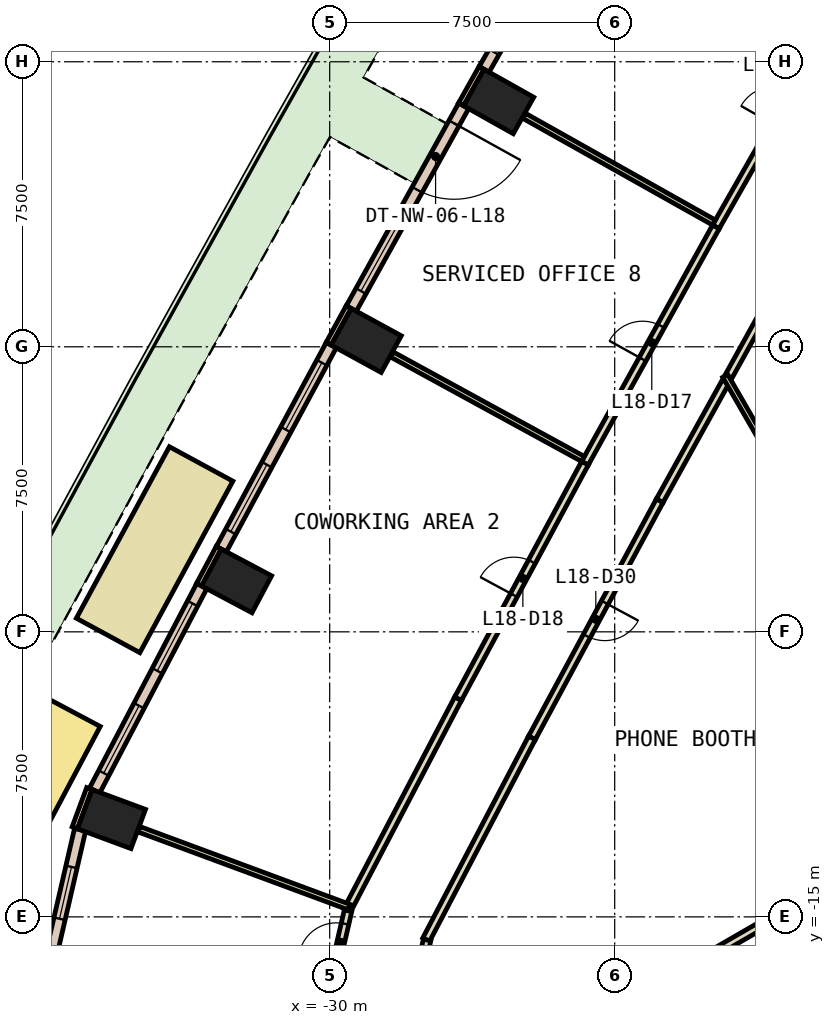
"""IFC4 building model, lengths in metres.
Left out: names, types, materials, properties, quantities, classifications, styles, units other than length and angle.
Written with IfcOpenShell. Run it as: python <this file> out.ifc"""

import sys

from ifc_helpers import new_model, si_unit, direction, frame, frame_2d, origin, origin_2d, place, context, subcontext, project, spatial, rectangle, extrude, element, fill, save


model = new_model("IFC4")
c1 = context("Model", 3, precision=1e-05, world=origin(), true_north=direction((0.0, 1.0)))
c2 = subcontext(c1, "Body", "Model", "MODEL_VIEW")
j1 = project(units=[si_unit("LENGTHUNIT", "METRE"), si_unit("PLANEANGLEUNIT", "RADIAN")], contexts=[c1])
p1 = place(None, origin())
s1 = spatial("IfcSite", under=j1, at=p1, CompositionType="ELEMENT")
p2 = place(p1, origin())
s2 = spatial("IfcBuilding", under=s1, at=p2, CompositionType="ELEMENT")
p3 = place(p2, frame((0.0, 0.0, 86.6)))
s3 = spatial("IfcBuildingStorey", under=s2, at=p3, CompositionType="ELEMENT", Elevation=86.6)
for number, where, z_axis, x_axis in (
    (1, (-25.554, 6.454, 0.0), (0.0, 0.0, 1.0), (0.49, 0.872, 0.0)),
    (2, (-29.039, 0.167, 0.0), (0.0, 0.0, 1.0), (0.48, 0.877, 0.0)),
    (3, (-32.449, -6.16, 0.0), (0.0, 0.0, 1.0), (0.469, 0.883, 0.0)),
    (4, (-35.741, -12.427, 0.0), (0.0, 0.0, 1.0), (0.347, 0.938, 0.0)),
):
    element("IfcColumn", number, at=place(p3, frame(where, z_axis=z_axis, x_axis=x_axis)), inside=s3, PredefinedType="COLUMN", context=c2, shape_type="SweptSolid", body=[
        extrude(rectangle(XDim=1.1, YDim=1.5, at=origin_2d()), origin(), (0.0, 0.0, 1.0), 3.8),
    ])
p4 = place(p3, frame((-26.004, 7.338, 0.0), z_axis=(0.0, 0.0, 1.0), x_axis=(-0.490008344094, -0.871717742574, 0.0)))
e5 = element("IfcWall", 5, at=p4, inside=s3, PredefinedType="STANDARD", context=c2, shape_type="SweptSolid", body=[
    extrude(rectangle(XDim=1.1, YDim=0.15, at=frame_2d((0.55, 0.0))), origin(), (0.0, 0.0, 1.0), 3.8),
])
p5 = place(p3, frame((-29.499, 1.046, 0.0), z_axis=(0.0, 0.0, 1.0), x_axis=(-0.479737645119, -0.877411985247, 0.0)))
e6 = element("IfcWall", 6, at=p5, inside=s3, PredefinedType="STANDARD", context=c2, shape_type="SweptSolid", body=[
    extrude(rectangle(XDim=1.101, YDim=0.15, at=frame_2d((0.55, 0.0))), origin(), (0.0, 0.0, 1.0), 3.8),
])
p6 = place(p3, frame((-32.92, -5.288, 0.0), z_axis=(0.0, 0.0, 1.0), x_axis=(-0.469366248657, -0.883003581319, 0.0)))
e7 = element("IfcWall", 7, at=p6, inside=s3, PredefinedType="STANDARD", context=c2, shape_type="SweptSolid", body=[
    extrude(rectangle(XDim=1.1, YDim=0.15, at=frame_2d((0.55, 0.0))), origin(), (0.0, 0.0, 1.0), 3.8),
])
p7 = place(p3, frame((-36.324, -11.624, 0.0), z_axis=(0.0, 0.0, 1.0), x_axis=(-0.347205967468, -0.937788897436, 0.0)))
e8 = element("IfcWall", 8, at=p7, inside=s3, PredefinedType="STANDARD", context=c2, shape_type="SweptSolid", body=[
    extrude(rectangle(XDim=1.1, YDim=0.15, at=frame_2d((0.55, 0.0))), origin(), (0.0, 0.0, 1.0), 3.8),
])
p8 = place(p3, frame((-22.918, 12.598, 0.0), z_axis=(0.0, 0.0, 1.0), x_axis=(-0.49492259535, -0.868937065967, 0.0)))
e9 = element("IfcWall", 9, at=p8, inside=s3, PredefinedType="STANDARD", context=c2, shape_type="SweptSolid", body=[
    extrude(rectangle(XDim=6.098, YDim=0.3, at=frame_2d((3.049, 0.0))), origin(), (0.0, 0.0, 1.0), 3.8),
])
p9 = place(p8, frame((0.525, 0.0, 0.9)))
e10 = element("IfcOpeningElement", 10, at=p9, cuts=e9, PredefinedType="OPENING", context=c2, shape_type="SweptSolid", body=[
    extrude(rectangle(XDim=2.0, YDim=2.6, at=frame_2d((1.0, 1.3))), frame((0.0, 0.16, 0.0), z_axis=(0.0, -1.0, 0.0), x_axis=(1.0, 0.0, 0.0)), (0.0, 0.0, 1.0), 0.32),
])
p10 = place(p8, frame((3.574, 0.0, 0.9)))
e11 = element("IfcOpeningElement", 11, at=p10, cuts=e9, PredefinedType="OPENING", context=c2, shape_type="SweptSolid", body=[
    extrude(rectangle(XDim=2.0, YDim=2.6, at=frame_2d((1.0, 1.3))), frame((0.0, 0.16, 0.0), z_axis=(0.0, -1.0, 0.0), x_axis=(1.0, 0.0, 0.0)), (0.0, 0.0, 1.0), 0.32),
])
p11 = place(p3, frame((-26.474, 6.341, 0.0), z_axis=(0.0, 0.0, 1.0), x_axis=(-0.484823579315, -0.874611969356, 0.0)))
e12 = element("IfcWall", 12, at=p11, inside=s3, PredefinedType="STANDARD", context=c2, shape_type="SweptSolid", body=[
    extrude(rectangle(XDim=6.099, YDim=0.3, at=frame_2d((3.049, 0.0))), origin(), (0.0, 0.0, 1.0), 3.8),
])
p12 = place(p11, frame((0.525, 0.0, 0.0)))
e13 = element("IfcOpeningElement", 13, at=p12, cuts=e12, PredefinedType="OPENING", context=c2, shape_type="SweptSolid", body=[
    extrude(rectangle(XDim=2.0, YDim=2.4, at=frame_2d((1.0, 1.2))), frame((0.0, 0.16, 0.0), z_axis=(0.0, -1.0, 0.0), x_axis=(1.0, 0.0, 0.0)), (0.0, 0.0, 1.0), 0.32),
])
p13 = place(p11, frame((3.574, 0.0, 0.9)))
e14 = element("IfcOpeningElement", 14, at=p13, cuts=e12, PredefinedType="OPENING", context=c2, shape_type="SweptSolid", body=[
    extrude(rectangle(XDim=2.0, YDim=2.6, at=frame_2d((1.0, 1.3))), frame((0.0, 0.16, 0.0), z_axis=(0.0, -1.0, 0.0), x_axis=(1.0, 0.0, 0.0)), (0.0, 0.0, 1.0), 0.32),
])
p14 = place(p3, frame((-29.958, 0.044, 0.0), z_axis=(0.0, 0.0, 1.0), x_axis=(-0.474369552216, -0.880325807829, 0.0)))
e15 = element("IfcWall", 15, at=p14, inside=s3, PredefinedType="STANDARD", context=c2, shape_type="SweptSolid", body=[
    extrude(rectangle(XDim=6.099, YDim=0.3, at=frame_2d((3.049, 0.0))), origin(), (0.0, 0.0, 1.0), 3.8),
])
p15 = place(p14, frame((0.525, 0.0, 0.9)))
e16 = element("IfcOpeningElement", 16, at=p15, cuts=e15, PredefinedType="OPENING", context=c2, shape_type="SweptSolid", body=[
    extrude(rectangle(XDim=2.0, YDim=2.6, at=frame_2d((1.0, 1.3))), frame((0.0, 0.16, 0.0), z_axis=(0.0, -1.0, 0.0), x_axis=(1.0, 0.0, 0.0)), (0.0, 0.0, 1.0), 0.32),
])
p16 = place(p14, frame((3.574, 0.0, 0.9)))
e17 = element("IfcOpeningElement", 17, at=p16, cuts=e15, PredefinedType="OPENING", context=c2, shape_type="SweptSolid", body=[
    extrude(rectangle(XDim=2.0, YDim=2.6, at=frame_2d((1.0, 1.3))), frame((0.0, 0.16, 0.0), z_axis=(0.0, -1.0, 0.0), x_axis=(1.0, 0.0, 0.0)), (0.0, 0.0, 1.0), 0.32),
])
p17 = place(p3, frame((-33.366, -6.295, 0.0), z_axis=(0.0, 0.0, 1.0), x_axis=(-0.464187178015, -0.885737130173, 0.0)))
e18 = element("IfcWall", 18, at=p17, inside=s3, PredefinedType="STANDARD", context=c2, shape_type="SweptSolid", body=[
    extrude(rectangle(XDim=6.075, YDim=0.3, at=frame_2d((3.038, 0.0))), origin(), (0.0, 0.0, 1.0), 3.8),
])
p18 = place(p17, frame((0.519, 0.0, 0.9)))
e19 = element("IfcOpeningElement", 19, at=p18, cuts=e18, PredefinedType="OPENING", context=c2, shape_type="SweptSolid", body=[
    extrude(rectangle(XDim=2.0, YDim=2.6, at=frame_2d((1.0, 1.3))), frame((0.0, 0.16, 0.0), z_axis=(0.0, -1.0, 0.0), x_axis=(1.0, 0.0, 0.0)), (0.0, 0.0, 1.0), 0.32),
])
p19 = place(p17, frame((3.556, 0.0, 0.9)))
e20 = element("IfcOpeningElement", 20, at=p19, cuts=e18, PredefinedType="OPENING", context=c2, shape_type="SweptSolid", body=[
    extrude(rectangle(XDim=2.0, YDim=2.6, at=frame_2d((1.0, 1.3))), frame((0.0, 0.16, 0.0), z_axis=(0.0, -1.0, 0.0), x_axis=(1.0, 0.0, 0.0)), (0.0, 0.0, 1.0), 0.32),
])
p20 = place(p3, frame((-36.568, -12.706, 0.0), z_axis=(0.0, 0.0, 1.0), x_axis=(-0.224859506699, -0.974391195695, 0.0)))
e21 = element("IfcWall", 21, at=p20, inside=s3, PredefinedType="STANDARD", context=c2, shape_type="SweptSolid", body=[
    extrude(rectangle(XDim=3.41, YDim=0.3, at=frame_2d((1.705, 0.0))), origin(), (0.0, 0.0, 1.0), 3.8),
])
p21 = place(p20, frame((1.005, 0.0, 0.9)))
e22 = element("IfcOpeningElement", 22, at=p21, cuts=e21, PredefinedType="OPENING", context=c2, shape_type="SweptSolid", body=[
    extrude(rectangle(XDim=1.4, YDim=2.6, at=frame_2d((0.7, 1.3))), frame((0.0, 0.16, 0.0), z_axis=(0.0, -1.0, 0.0), x_axis=(1.0, 0.0, 0.0)), (0.0, 0.0, 1.0), 0.32),
])
p22 = place(p3, frame((-33.383, -3.082, 0.0), z_axis=(0.0, 0.0, 1.0), x_axis=(-0.476808502213, -0.879007196909, 0.0)))
e23 = element("IfcWall", 23, at=p22, inside=s3, PredefinedType="STANDARD", context=c2, shape_type="SweptSolid", body=[
    extrude(rectangle(XDim=5.134, YDim=1.9, at=frame_2d((2.567, 0.0))), origin(), (0.0, 0.0, 1.0), 0.8),
])
p23 = place(p3, frame((-36.877, -9.544, 0.0), z_axis=(0.0, 0.0, 1.0), x_axis=(-0.468973311577, -0.883212337453, 0.0)))
e24 = element("IfcWall", 24, at=p23, inside=s3, PredefinedType="STANDARD", context=c2, shape_type="SweptSolid", body=[
    extrude(rectangle(XDim=5.299, YDim=1.9, at=frame_2d((2.649, 0.0))), origin(), (0.0, 0.0, 1.0), 0.8),
])
p24 = place(p3, frame((-17.883, 2.143, 0.0), z_axis=(0.0, 0.0, 1.0), x_axis=(-0.484695523805, -0.874682942101, 0.0)))
e25 = element("IfcWall", 25, at=p24, inside=s3, PredefinedType="PARTITIONING", context=c2, shape_type="SweptSolid", body=[
    extrude(rectangle(XDim=3.349, YDim=0.2, at=frame_2d((1.674, 0.0))), origin(), (0.0, 0.0, 1.0), 3.8),
])
p25 = place(p3, frame((-19.579, -0.917, 0.0), z_axis=(0.0, 0.0, 1.0), x_axis=(-0.484700239797, -0.874680328772, 0.0)))
e26 = element("IfcWall", 26, at=p25, inside=s3, PredefinedType="PARTITIONING", context=c2, shape_type="SweptSolid", body=[
    extrude(rectangle(XDim=3.585, YDim=0.2, at=frame_2d((1.792, 0.0))), origin(), (0.0, 0.0, 1.0), 3.8),
])
p26 = place(p3, frame((-21.317, -4.053, 0.0), z_axis=(0.0, 0.0, 1.0), x_axis=(-0.474391588657, -0.880313932987, 0.0)))
e27 = element("IfcWall", 27, at=p26, inside=s3, PredefinedType="PARTITIONING", context=c2, shape_type="SweptSolid", body=[
    extrude(rectangle(XDim=7.085, YDim=0.2, at=frame_2d((3.542, 0.0))), origin(), (0.0, 0.0, 1.0), 3.8),
])
p27 = place(p26, frame((3.042, 0.0, 0.0)))
e28 = element("IfcOpeningElement", 28, at=p27, cuts=e27, PredefinedType="OPENING", context=c2, shape_type="SweptSolid", body=[
    extrude(rectangle(XDim=1.0, YDim=2.1, at=frame_2d((0.5, 1.05))), frame((0.0, 0.11, 0.0), z_axis=(0.0, -1.0, 0.0), x_axis=(1.0, 0.0, 0.0)), (0.0, 0.0, 1.0), 0.22),
])
p28 = place(p3, frame((-24.678, -10.29, 0.0), z_axis=(0.0, 0.0, 1.0), x_axis=(-0.464203280494, -0.885728691179, 0.0)))
e29 = element("IfcWall", 29, at=p28, inside=s3, PredefinedType="PARTITIONING", context=c2, shape_type="SweptSolid", body=[
    extrude(rectangle(XDim=5.995, YDim=0.2, at=frame_2d((2.998, 0.0))), origin(), (0.0, 0.0, 1.0), 3.8),
])
p29 = place(p3, frame((-27.437, -15.609, 0.0), z_axis=(0.0, 0.0, 1.0), x_axis=(-0.224098195188, -0.97456656977, 0.0)))
e30 = element("IfcWall", 30, at=p29, inside=s3, PredefinedType="PARTITIONING", context=c2, shape_type="SweptSolid", body=[
    extrude(rectangle(XDim=0.375, YDim=0.2, at=frame_2d((0.188, 0.0))), origin(), (0.0, 0.0, 1.0), 3.8),
])
p30 = place(p3, frame((-19.838, 3.156, 0.0), z_axis=(0.0, 0.0, 1.0), x_axis=(0.494978648769, 0.868905137091, 0.0)))
e31 = element("IfcWall", 31, at=p30, inside=s3, PredefinedType="PARTITIONING", context=c2, shape_type="SweptSolid", body=[
    extrude(rectangle(XDim=7.186, YDim=0.2, at=frame_2d((3.593, 0.0))), origin(), (0.0, 0.0, 1.0), 3.8),
])
p31 = place(p30, frame((3.093, 0.0, 0.0)))
e32 = element("IfcOpeningElement", 32, at=p31, cuts=e31, PredefinedType="OPENING", context=c2, shape_type="SweptSolid", body=[
    extrude(rectangle(XDim=1.0, YDim=2.1, at=frame_2d((0.5, 1.05))), frame((0.0, 0.11, 0.0), z_axis=(0.0, -1.0, 0.0), x_axis=(1.0, 0.0, 0.0)), (0.0, 0.0, 1.0), 0.22),
])
p32 = place(p3, frame((-23.284, -3.064, 0.0), z_axis=(0.0, 0.0, 1.0), x_axis=(0.48478560119, 0.874633020689, 0.0)))
e33 = element("IfcWall", 33, at=p32, inside=s3, PredefinedType="PARTITIONING", context=c2, shape_type="SweptSolid", body=[
    extrude(rectangle(XDim=7.11, YDim=0.2, at=frame_2d((3.555, 0.0))), origin(), (0.0, 0.0, 1.0), 3.8),
])
p33 = place(p32, frame((3.13, 0.0, 0.0)))
e34 = element("IfcOpeningElement", 34, at=p33, cuts=e33, PredefinedType="OPENING", context=c2, shape_type="SweptSolid", body=[
    extrude(rectangle(XDim=1.0, YDim=2.1, at=frame_2d((0.5, 1.05))), frame((0.0, 0.11, 0.0), z_axis=(0.0, -1.0, 0.0), x_axis=(1.0, 0.0, 0.0)), (0.0, 0.0, 1.0), 0.22),
])
p34 = place(p3, frame((-29.541, -14.829, 0.0), z_axis=(0.0, 0.0, 1.0), x_axis=(0.46422598759, 0.885716790202, 0.0)))
e35 = element("IfcWall", 35, at=p34, inside=s3, PredefinedType="PARTITIONING", context=c2, shape_type="SweptSolid", body=[
    extrude(rectangle(XDim=6.29, YDim=0.2, at=frame_2d((3.145, 0.0))), origin(), (0.0, 0.0, 1.0), 3.8),
])
p35 = place(p3, frame((-26.621, -9.258, 0.0), z_axis=(0.0, 0.0, 1.0), x_axis=(0.474414295505, 0.880301696136, 0.0)))
e36 = element("IfcWall", 36, at=p35, inside=s3, PredefinedType="PARTITIONING", context=c2, shape_type="SweptSolid", body=[
    extrude(rectangle(XDim=7.036, YDim=0.2, at=frame_2d((3.518, 0.0))), origin(), (0.0, 0.0, 1.0), 3.8),
])
p36 = place(p35, frame((3.093, 0.0, 0.0)))
e37 = element("IfcOpeningElement", 37, at=p36, cuts=e36, PredefinedType="OPENING", context=c2, shape_type="SweptSolid", body=[
    extrude(rectangle(XDim=1.0, YDim=2.1, at=frame_2d((0.5, 1.05))), frame((0.0, 0.11, 0.0), z_axis=(0.0, -1.0, 0.0), x_axis=(1.0, 0.0, 0.0)), (0.0, 0.0, 1.0), 0.22),
])
p37 = place(p3, frame((-29.9, -16.501, 0.0), z_axis=(0.0, 0.0, 1.0), x_axis=(0.224316169854, 0.974516421587, 0.0)))
e38 = element("IfcWall", 38, at=p37, inside=s3, PredefinedType="PARTITIONING", context=c2, shape_type="SweptSolid", body=[
    extrude(rectangle(XDim=1.707, YDim=0.2, at=frame_2d((0.853, 0.0))), origin(), (0.0, 0.0, 1.0), 3.8),
])
p38 = place(p37, frame((0.353, 0.0, 0.0)))
e39 = element("IfcOpeningElement", 39, at=p38, cuts=e38, PredefinedType="OPENING", context=c2, shape_type="SweptSolid", body=[
    extrude(rectangle(XDim=1.0, YDim=2.1, at=frame_2d((0.5, 1.05))), frame((0.0, 0.11, 0.0), z_axis=(0.0, -1.0, 0.0), x_axis=(1.0, 0.0, 0.0)), (0.0, 0.0, 1.0), 0.22),
])
p39 = place(p3, frame((-13.072, -12.009, 0.0), z_axis=(0.0, 0.0, 1.0), x_axis=(-0.865993734772, -0.500054848326, 0.0)))
e40 = element("IfcWall", 40, at=p39, inside=s3, PredefinedType="PARTITIONING", context=c2, shape_type="SweptSolid", body=[
    extrude(rectangle(XDim=8.583, YDim=0.2, at=frame_2d((4.292, 0.0))), origin(), (0.0, 0.0, 1.0), 3.8),
])
p40 = place(p3, frame((-19.888, 3.27, 0.0), z_axis=(0.0, 0.0, 1.0), x_axis=(-0.871789386467, 0.489880868828, 0.0)))
e41 = element("IfcWall", 41, at=p40, inside=s3, PredefinedType="PARTITIONING", context=c2, shape_type="SweptSolid", body=[
    extrude(rectangle(XDim=5.73, YDim=0.15, at=frame_2d((2.865, 0.0))), origin(), (0.0, 0.0, 1.0), 3.8),
])
p41 = place(p3, frame((-23.336, -2.95, 0.0), z_axis=(0.0, 0.0, 1.0), x_axis=(-0.877455496162, 0.479658057637, 0.0)))
e42 = element("IfcWall", 42, at=p41, inside=s3, PredefinedType="PARTITIONING", context=c2, shape_type="SweptSolid", body=[
    extrude(rectangle(XDim=5.729, YDim=0.15, at=frame_2d((2.865, 0.0))), origin(), (0.0, 0.0, 1.0), 3.8),
])
p42 = place(p3, frame((-29.494, -14.741, 0.0), z_axis=(0.0, 0.0, 1.0), x_axis=(-0.937719767819, 0.347392626636, 0.0)))
e43 = element("IfcWall", 43, at=p42, inside=s3, PredefinedType="PARTITIONING", context=c2, shape_type="SweptSolid", body=[
    extrude(rectangle(XDim=5.892, YDim=0.15, at=frame_2d((2.946, 0.0))), origin(), (0.0, 0.0, 1.0), 3.8),
])
p43 = place(p3, frame((-15.225, -8.328, 0.0), z_axis=(0.0, 0.0, 1.0), x_axis=(-0.500038648455, 0.866003088939, 0.0)))
e44 = element("IfcWall", 44, at=p43, inside=s3, PredefinedType="PARTITIONING", context=c2, shape_type="SweptSolid", body=[
    extrude(rectangle(XDim=8.733, YDim=0.15, at=frame_2d((4.367, 0.0))), origin(), (0.0, 0.0, 1.0), 3.8),
])
p44 = place(p10, origin())
e45 = element("IfcWindow", 45, at=p44, inside=s3, PartitioningType="SINGLE_PANEL", PredefinedType="WINDOW", context=c2, shape_type="SweptSolid", body=[
    extrude(rectangle(XDim=2.0, YDim=2.6, at=frame_2d((1.0, 1.3))), frame((0.0, 0.03, 0.0), z_axis=(0.0, -1.0, 0.0), x_axis=(1.0, 0.0, 0.0)), (0.0, 0.0, 1.0), 0.06),
])
fill(e11, e45)
p45 = place(p12, origin())
e46 = element("IfcDoor", 46, at=p45, inside=s3, OperationType="SLIDING_TO_LEFT", PredefinedType="DOOR", context=c2, shape_type="SweptSolid", body=[
    extrude(rectangle(XDim=2.0, YDim=2.4, at=frame_2d((1.0, 1.2))), frame((0.0, 0.025, 0.0), z_axis=(0.0, -1.0, 0.0), x_axis=(1.0, 0.0, 0.0)), (0.0, 0.0, 1.0), 0.05),
])
fill(e13, e46)
p46 = place(p13, origin())
e47 = element("IfcWindow", 47, at=p46, inside=s3, PartitioningType="SINGLE_PANEL", PredefinedType="WINDOW", context=c2, shape_type="SweptSolid", body=[
    extrude(rectangle(XDim=2.0, YDim=2.6, at=frame_2d((1.0, 1.3))), frame((0.0, 0.03, 0.0), z_axis=(0.0, -1.0, 0.0), x_axis=(1.0, 0.0, 0.0)), (0.0, 0.0, 1.0), 0.06),
])
fill(e14, e47)
p47 = place(p15, origin())
e48 = element("IfcWindow", 48, at=p47, inside=s3, PartitioningType="SINGLE_PANEL", PredefinedType="WINDOW", context=c2, shape_type="SweptSolid", body=[
    extrude(rectangle(XDim=2.0, YDim=2.6, at=frame_2d((1.0, 1.3))), frame((0.0, 0.03, 0.0), z_axis=(0.0, -1.0, 0.0), x_axis=(1.0, 0.0, 0.0)), (0.0, 0.0, 1.0), 0.06),
])
fill(e16, e48)
p48 = place(p16, origin())
e49 = element("IfcWindow", 49, at=p48, inside=s3, PartitioningType="SINGLE_PANEL", PredefinedType="WINDOW", context=c2, shape_type="SweptSolid", body=[
    extrude(rectangle(XDim=2.0, YDim=2.6, at=frame_2d((1.0, 1.3))), frame((0.0, 0.03, 0.0), z_axis=(0.0, -1.0, 0.0), x_axis=(1.0, 0.0, 0.0)), (0.0, 0.0, 1.0), 0.06),
])
fill(e17, e49)
p49 = place(p18, origin())
e50 = element("IfcWindow", 50, at=p49, inside=s3, PartitioningType="SINGLE_PANEL", PredefinedType="WINDOW", context=c2, shape_type="SweptSolid", body=[
    extrude(rectangle(XDim=2.0, YDim=2.6, at=frame_2d((1.0, 1.3))), frame((0.0, 0.03, 0.0), z_axis=(0.0, -1.0, 0.0), x_axis=(1.0, 0.0, 0.0)), (0.0, 0.0, 1.0), 0.06),
])
fill(e19, e50)
p50 = place(p19, origin())
e51 = element("IfcWindow", 51, at=p50, inside=s3, PartitioningType="SINGLE_PANEL", PredefinedType="WINDOW", context=c2, shape_type="SweptSolid", body=[
    extrude(rectangle(XDim=2.0, YDim=2.6, at=frame_2d((1.0, 1.3))), frame((0.0, 0.03, 0.0), z_axis=(0.0, -1.0, 0.0), x_axis=(1.0, 0.0, 0.0)), (0.0, 0.0, 1.0), 0.06),
])
fill(e20, e51)
p51 = place(p21, origin())
e52 = element("IfcWindow", 52, at=p51, inside=s3, PartitioningType="SINGLE_PANEL", PredefinedType="WINDOW", context=c2, shape_type="SweptSolid", body=[
    extrude(rectangle(XDim=1.4, YDim=2.6, at=frame_2d((0.7, 1.3))), frame((0.0, 0.03, 0.0), z_axis=(0.0, -1.0, 0.0), x_axis=(1.0, 0.0, 0.0)), (0.0, 0.0, 1.0), 0.06),
])
fill(e22, e52)
p52 = place(p33, origin())
e53 = element("IfcDoor", 53, at=p52, inside=s3, OperationType="SINGLE_SWING_LEFT", PredefinedType="DOOR", context=c2, shape_type="SweptSolid", body=[
    extrude(rectangle(XDim=1.0, YDim=2.1, at=frame_2d((0.5, 1.05))), frame((0.0, 0.025, 0.0), z_axis=(0.0, -1.0, 0.0), x_axis=(1.0, 0.0, 0.0)), (0.0, 0.0, 1.0), 0.05),
])
fill(e34, e53)
p53 = place(p36, origin())
e54 = element("IfcDoor", 54, at=p53, inside=s3, OperationType="SINGLE_SWING_LEFT", PredefinedType="DOOR", context=c2, shape_type="SweptSolid", body=[
    extrude(rectangle(XDim=1.0, YDim=2.1, at=frame_2d((0.5, 1.05))), frame((0.0, 0.025, 0.0), z_axis=(0.0, -1.0, 0.0), x_axis=(1.0, 0.0, 0.0)), (0.0, 0.0, 1.0), 0.05),
])
fill(e37, e54)
p54 = place(p38, origin())
e55 = element("IfcDoor", 55, at=p54, inside=s3, OperationType="SINGLE_SWING_RIGHT", PredefinedType="DOOR", context=c2, shape_type="SweptSolid", body=[
    extrude(rectangle(XDim=1.0, YDim=2.1, at=frame_2d((0.5, 1.05))), frame((0.0, 0.025, 0.0), z_axis=(0.0, -1.0, 0.0), x_axis=(1.0, 0.0, 0.0)), (0.0, 0.0, 1.0), 0.05),
])
fill(e39, e55)
p55 = place(p27, origin())
e56 = element("IfcDoor", 56, at=p55, inside=s3, OperationType="SINGLE_SWING_RIGHT", PredefinedType="DOOR", context=c2, shape_type="SweptSolid", body=[
    extrude(rectangle(XDim=1.0, YDim=2.1, at=frame_2d((0.5, 1.05))), frame((0.0, 0.025, 0.0), z_axis=(0.0, -1.0, 0.0), x_axis=(1.0, 0.0, 0.0)), (0.0, 0.0, 1.0), 0.05),
])
fill(e28, e56)
save(model, sys.argv[1])
